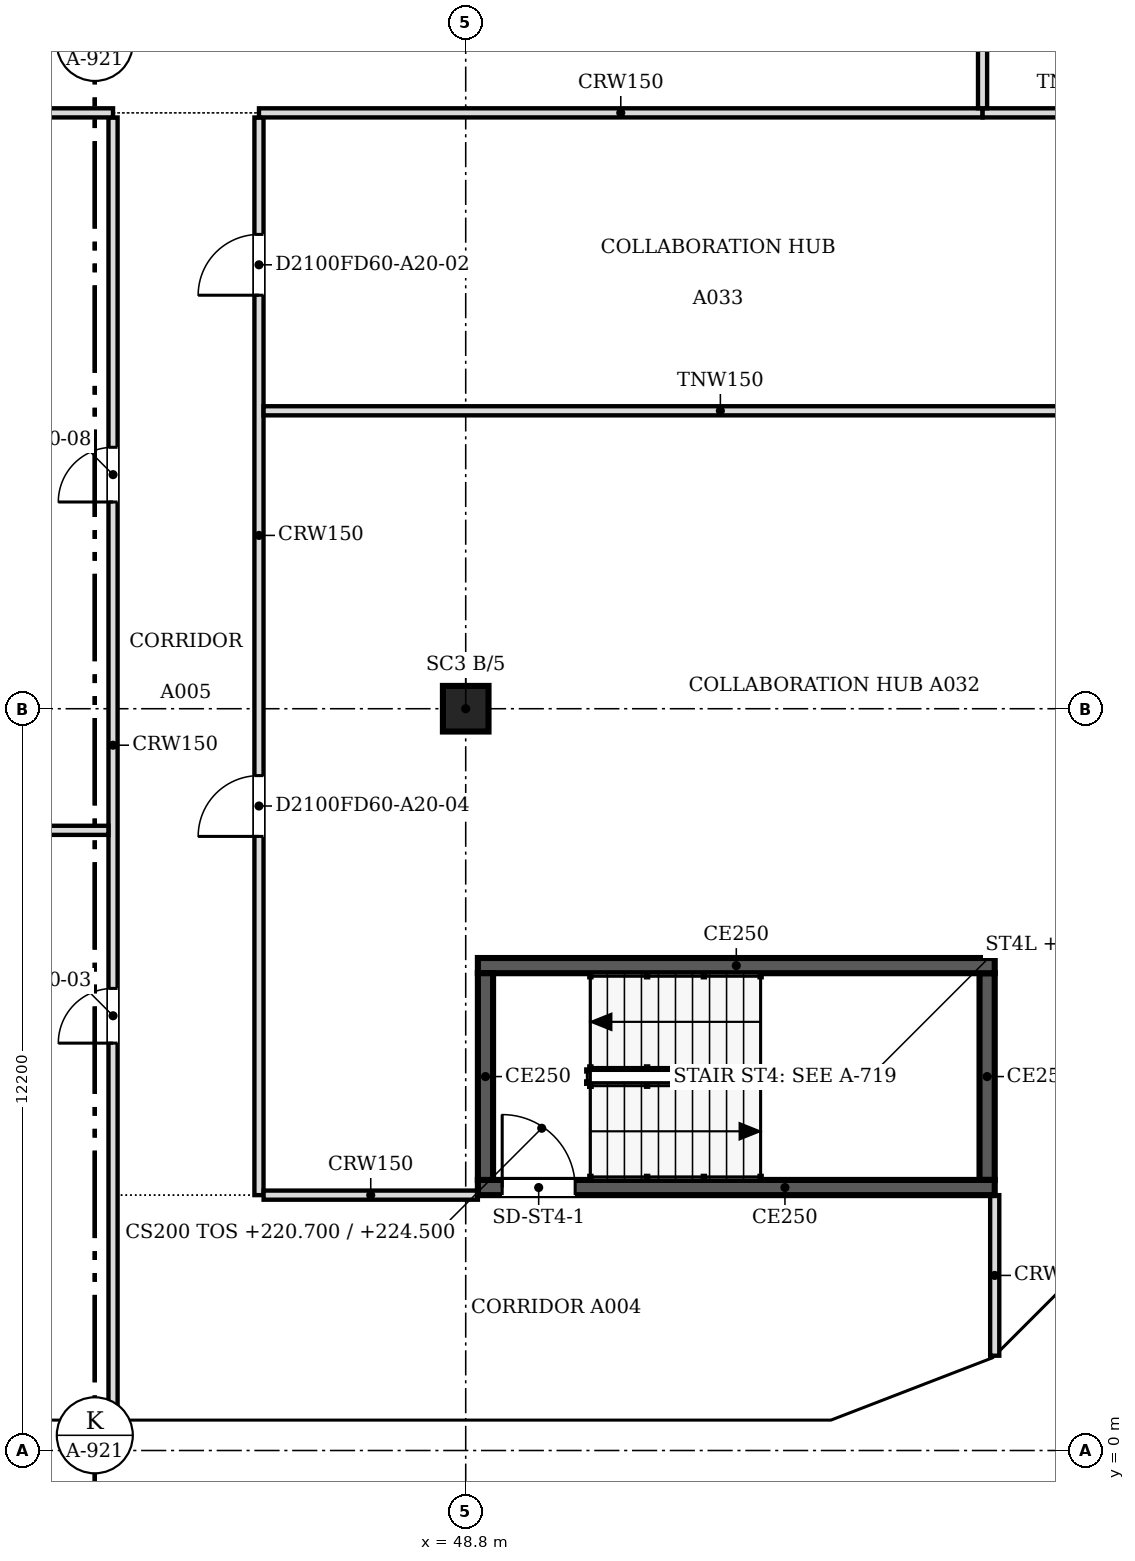
"""IFC4 building model, lengths in metres.
Left out: names, types, materials, properties, quantities, classifications, styles, units other than length and angle.
Written with IfcOpenShell. Run it as: python <this file> out.ifc"""

import sys

from ifc_helpers import new_model, si_unit, direction, frame, frame_2d, origin, origin_2d, place, context, subcontext, project, spatial, polyline, rectangle, outline, extrude, faceted_brep, source, transform, mapped, element, fill, save


model = new_model("IFC4")
c1 = context("Model", 3, precision=1e-05, world=origin(), true_north=direction((0.0, 1.0)))
c2 = subcontext(c1, "Body", "Model", "MODEL_VIEW")
j1 = project(units=[si_unit("LENGTHUNIT", "METRE"), si_unit("PLANEANGLEUNIT", "RADIAN")], contexts=[c1])
p1 = place(None, origin())
s1 = spatial("IfcSite", under=j1, at=p1, CompositionType="ELEMENT")
p2 = place(p1, origin())
s2 = spatial("IfcBuilding", under=s1, at=p2, CompositionType="ELEMENT")
p3 = place(p2, frame((0.0, 0.0, 220.7)))
s3 = spatial("IfcBuildingStorey", under=s2, at=p3, CompositionType="ELEMENT", Elevation=220.7)
p4 = place(p3, frame((48.8, 12.2, 0.0), z_axis=(0.0, 0.0, 1.0), x_axis=(1.0, 0.0, 0.0)))
e1 = element("IfcColumn", 1, at=p4, inside=s3, PredefinedType="COLUMN", context=c2, shape_type="SweptSolid", body=[
    extrude(rectangle(XDim=0.75, YDim=0.75, at=origin_2d()), origin(), (0.0, 0.0, 1.0), 3.6),
])
m1 = source(origin(), c2, "Body", "SweptSolid", [
    extrude(outline(polyline([(3.05, 0.0), (6.1, 3.8), (3.05, 7.6), (0.0, 3.8), (3.05, 0.0)])), frame((0.0, 0.25, 0.0), z_axis=(0.0, -1.0, 0.0), x_axis=(1.0, 0.0, 0.0)), (0.0, 0.0, 1.0), 0.5),
])
p5 = place(p3, frame((39.65, 0.25, -3.8), z_axis=(0.0, 0.0, 1.0), x_axis=(1.0, 0.0, 0.0)))
e2 = element("IfcWall", 2, at=p5, inside=s3, PredefinedType="SOLIDWALL", context=c2, shape_type="MappedRepresentation", body=[
    mapped(m1, transform((0.0, 0.0, 0.0), scale=1.0)),
])
m2 = source(origin(), c2, "Body", "SweptSolid", [
    extrude(outline(polyline([(3.05, 0.399), (5.78, 3.8), (3.05, 7.201), (0.321, 3.8), (3.05, 0.399)])), frame((0.0, 0.26, 0.0), z_axis=(0.0, -1.0, 0.0), x_axis=(1.0, 0.0, 0.0)), (0.0, 0.0, 1.0), 0.52),
])
p6 = place(p5, origin())
e3 = element("IfcOpeningElement", 3, at=p6, cuts=e2, PredefinedType="OPENING", context=c2, shape_type="MappedRepresentation", body=[
    mapped(m2, transform((0.0, 0.0, 0.0), scale=1.0)),
])
p7 = place(p3, frame((45.75, 0.25, -3.8), z_axis=(0.0, 0.0, 1.0), x_axis=(1.0, 0.0, 0.0)))
e4 = element("IfcWall", 4, at=p7, inside=s3, PredefinedType="SOLIDWALL", context=c2, shape_type="MappedRepresentation", body=[
    mapped(m1, transform((0.0, 0.0, 0.0), scale=1.0)),
])
p8 = place(p7, origin())
e5 = element("IfcOpeningElement", 5, at=p8, cuts=e4, PredefinedType="OPENING", context=c2, shape_type="MappedRepresentation", body=[
    mapped(m2, transform((0.0, 0.0, 0.0), scale=1.0)),
])
m3 = source(origin(), c2, "Body", "Brep", [
    faceted_brep([(3.003, -0.25, 0.0), (3.05, -0.25, 0.06), (3.05, -0.25, 7.54), (3.003, -0.25, 7.6), (0.0, -0.25, 3.8), (0.0, 0.25, 3.8), (2.957, 0.25, 7.541), (2.957, 0.25, 0.059), (3.003, 0.0, 0.0), (3.003, 0.0, 7.6)], [[[0, 1, 2, 3, 4]], [[5, 6, 7]], [[1, 0, 8]], [[9, 3, 2]], [[6, 5, 4, 3, 9]], [[5, 7, 8, 0, 4]], [[1, 8, 7, 6, 9, 2]]]),
])
p9 = place(p3, frame((51.85, 0.25, -3.8), z_axis=(0.0, 0.0, 1.0), x_axis=(1.0, 0.0, 0.0)))
e6 = element("IfcWall", 6, at=p9, inside=s3, PredefinedType="SOLIDWALL", context=c2, shape_type="MappedRepresentation", body=[
    mapped(m3, transform((0.0, 0.0, 0.0), scale=1.0)),
])
m4 = source(origin(), c2, "Body", "SweptSolid", [
    extrude(outline(polyline([(2.803, 6.944), (0.319, 3.8), (2.803, 0.656), (2.803, 6.944)])), frame((0.0, 0.26, 0.0), z_axis=(0.0, -1.0, 0.0), x_axis=(1.0, 0.0, 0.0)), (0.0, 0.0, 1.0), 0.52),
])
p10 = place(p9, origin())
e7 = element("IfcOpeningElement", 7, at=p10, cuts=e6, PredefinedType="OPENING", context=c2, shape_type="MappedRepresentation", body=[
    mapped(m4, transform((0.0, 0.0, 0.0), scale=1.0)),
])
m5 = source(origin(), c2, "Body", "Brep", [
    faceted_brep([(0.047, -0.25, 0.0), (2.997, -0.25, 3.8), (0.047, -0.25, 7.6), (0.0, -0.25, 7.541), (0.0, -0.25, 0.059), (0.093, 0.25, 7.54), (2.944, 0.25, 3.868), (2.944, 0.25, 3.732), (0.093, 0.25, 0.06), (2.997, 0.0, 3.8), (0.047, 0.0, 0.0), (0.047, 0.0, 7.6)], [[[0, 1, 2, 3, 4]], [[5, 6, 7, 8]], [[8, 7, 9, 1, 0, 10]], [[6, 5, 11, 2, 1, 9]], [[3, 2, 11]], [[10, 0, 4]], [[8, 10, 4, 3, 11, 5]], [[9, 7, 6]]]),
])
p11 = place(p3, frame((54.81, 0.233, -3.8), z_axis=(0.0, 0.0, 1.0), x_axis=(0.932990326376, 0.359901446078, 0.0)))
e8 = element("IfcWall", 8, at=p11, inside=s3, PredefinedType="SOLIDWALL", context=c2, shape_type="MappedRepresentation", body=[
    mapped(m5, transform((0.0, 0.0, 0.0), scale=1.0)),
])
m6 = source(origin(), c2, "Body", "SweptSolid", [
    extrude(outline(polyline([(0.247, 0.665), (2.681, 3.8), (0.247, 6.935), (0.247, 0.665)])), frame((0.0, 0.26, 0.0), z_axis=(0.0, -1.0, 0.0), x_axis=(1.0, 0.0, 0.0)), (0.0, 0.0, 1.0), 0.52),
])
p12 = place(p11, origin())
e9 = element("IfcOpeningElement", 9, at=p12, cuts=e8, PredefinedType="OPENING", context=c2, shape_type="MappedRepresentation", body=[
    mapped(m6, transform((0.0, 0.0, 0.0), scale=1.0)),
])
m7 = source(origin(), c2, "Body", "Brep", [
    faceted_brep([(2.944, -0.25, 0.0), (2.997, -0.25, 0.068), (2.997, -0.25, 7.532), (2.944, -0.25, 7.6), (0.0, -0.25, 3.8), (0.053, 0.25, 3.868), (2.891, 0.25, 7.532), (2.891, 0.25, 0.068), (0.053, 0.25, 3.732), (2.944, 0.0, 0.0), (2.944, 0.0, 7.6), (0.0, 0.0, 3.8)], [[[0, 1, 2, 3, 4]], [[5, 6, 7, 8]], [[1, 0, 9]], [[10, 3, 2]], [[6, 5, 11, 4, 3, 10]], [[8, 7, 9, 0, 4, 11]], [[8, 11, 5]], [[1, 9, 7, 6, 10, 2]]]),
])
p13 = place(p3, frame((57.606, 1.312, -3.8), z_axis=(0.0, 0.0, 1.0), x_axis=(0.707147509625, 0.707066050402, 0.0)))
e10 = element("IfcWall", 10, at=p13, inside=s3, PredefinedType="SOLIDWALL", context=c2, shape_type="MappedRepresentation", body=[
    mapped(m7, transform((0.0, 0.0, 0.0), scale=1.0)),
])
m8 = source(origin(), c2, "Body", "SweptSolid", [
    extrude(outline(polyline([(2.744, 6.934), (0.316, 3.8), (2.744, 0.667), (2.744, 6.934)])), frame((0.0, 0.26, 0.0), z_axis=(0.0, -1.0, 0.0), x_axis=(1.0, 0.0, 0.0)), (0.0, 0.0, 1.0), 0.52),
])
p14 = place(p13, origin())
e11 = element("IfcOpeningElement", 11, at=p14, cuts=e10, PredefinedType="OPENING", context=c2, shape_type="MappedRepresentation", body=[
    mapped(m8, transform((0.0, 0.0, 0.0), scale=1.0)),
])
p15 = place(p2, frame((0.0, 0.0, 224.5)))
s4 = spatial("IfcBuildingStorey", under=s2, at=p15, CompositionType="ELEMENT", Elevation=224.5)
m9 = source(origin(), c2, "Body", "Brep", [
    faceted_brep([(3.05, -0.25, 0.0), (6.1, -0.25, 3.8), (6.1, -0.25, 3.8), (3.05, -0.25, 7.6), (0.0, -0.25, 3.8), (0.0, 0.25, 3.8), (3.05, 0.25, 7.6), (6.1, 0.25, 3.8), (6.1, 0.25, 3.8), (3.05, 0.25, 0.0)], [[[0, 1, 2, 3, 4]], [[5, 6, 7, 8, 9]], [[9, 8, 1, 0]], [[7, 6, 3, 2]], [[6, 5, 4, 3]], [[5, 9, 0, 4]], [[1, 8, 7, 2]]]),
])
p16 = place(p15, frame((36.6, 0.25, -3.8), z_axis=(0.0, 0.0, 1.0), x_axis=(1.0, 0.0, 0.0)))
e12 = element("IfcWall", 12, at=p16, inside=s4, PredefinedType="SOLIDWALL", context=c2, shape_type="MappedRepresentation", body=[
    mapped(m9, transform((0.0, 0.0, 0.0), scale=1.0)),
])
p17 = place(p16, origin())
e13 = element("IfcOpeningElement", 13, at=p17, cuts=e12, PredefinedType="OPENING", context=c2, shape_type="MappedRepresentation", body=[
    mapped(m2, transform((0.0, 0.0, 0.0), scale=1.0)),
])
p18 = place(p15, frame((42.7, 0.25, -3.8), z_axis=(0.0, 0.0, 1.0), x_axis=(1.0, 0.0, 0.0)))
e14 = element("IfcWall", 14, at=p18, inside=s4, PredefinedType="SOLIDWALL", context=c2, shape_type="MappedRepresentation", body=[
    mapped(m1, transform((0.0, 0.0, 0.0), scale=1.0)),
])
p19 = place(p18, origin())
e15 = element("IfcOpeningElement", 15, at=p19, cuts=e14, PredefinedType="OPENING", context=c2, shape_type="MappedRepresentation", body=[
    mapped(m2, transform((0.0, 0.0, 0.0), scale=1.0)),
])
m10 = source(origin(), c2, "Body", "Brep", [
    faceted_brep([(3.05, -0.25, 0.0), (6.053, -0.25, 3.8), (3.05, -0.25, 7.6), (0.0, -0.25, 3.8), (0.0, 0.25, 3.8), (3.05, 0.25, 7.6), (6.007, 0.25, 3.859), (6.007, 0.25, 3.741), (3.05, 0.25, 0.0), (6.053, 0.0, 3.8)], [[[0, 1, 2, 3]], [[4, 5, 6, 7, 8]], [[8, 7, 9, 1, 0]], [[6, 5, 2, 1, 9]], [[5, 4, 3, 2]], [[4, 8, 0, 3]], [[9, 7, 6]]]),
])
p20 = place(p15, frame((48.8, 0.25, -3.8), z_axis=(0.0, 0.0, 1.0), x_axis=(1.0, 0.0, 0.0)))
e16 = element("IfcWall", 16, at=p20, inside=s4, PredefinedType="SOLIDWALL", context=c2, shape_type="MappedRepresentation", body=[
    mapped(m10, transform((0.0, 0.0, 0.0), scale=1.0)),
])
m11 = source(origin(), c2, "Body", "SweptSolid", [
    extrude(outline(polyline([(3.049, 0.401), (5.735, 3.8), (3.049, 7.199), (0.321, 3.8), (3.049, 0.401)])), frame((0.0, 0.26, 0.0), z_axis=(0.0, -1.0, 0.0), x_axis=(1.0, 0.0, 0.0)), (0.0, 0.0, 1.0), 0.52),
])
p21 = place(p20, origin())
e17 = element("IfcOpeningElement", 17, at=p21, cuts=e16, PredefinedType="OPENING", context=c2, shape_type="MappedRepresentation", body=[
    mapped(m11, transform((0.0, 0.0, 0.0), scale=1.0)),
])
m12 = source(origin(), c2, "Body", "Brep", [
    faceted_brep([(2.95, -0.25, 0.0), (3.003, -0.25, 0.068), (3.003, -0.25, 7.532), (2.95, -0.25, 7.6), (0.0, -0.25, 3.8), (0.047, 0.25, 3.86), (2.898, 0.25, 7.532), (2.898, 0.25, 0.068), (0.047, 0.25, 3.74), (2.95, 0.0, 0.0), (2.95, 0.0, 7.6), (0.0, 0.0, 3.8)], [[[0, 1, 2, 3, 4]], [[5, 6, 7, 8]], [[1, 0, 9]], [[10, 3, 2]], [[6, 5, 11, 4, 3, 10]], [[8, 7, 9, 0, 4, 11]], [[8, 11, 5]], [[1, 9, 7, 6, 10, 2]]]),
])
p22 = place(p15, frame((54.854, 0.25, -3.8), z_axis=(0.0, 0.0, 1.0), x_axis=(0.932970071518, 0.359953949349, 0.0)))
e18 = element("IfcWall", 18, at=p22, inside=s4, PredefinedType="SOLIDWALL", context=c2, shape_type="MappedRepresentation", body=[
    mapped(m12, transform((0.0, 0.0, 0.0), scale=1.0)),
])
m13 = source(origin(), c2, "Body", "SweptSolid", [
    extrude(outline(polyline([(2.75, 6.935), (0.316, 3.8), (2.75, 0.665), (2.75, 6.935)])), frame((0.0, 0.26, 0.0), z_axis=(0.0, -1.0, 0.0), x_axis=(1.0, 0.0, 0.0)), (0.0, 0.0, 1.0), 0.52),
])
p23 = place(p22, origin())
e19 = element("IfcOpeningElement", 19, at=p23, cuts=e18, PredefinedType="OPENING", context=c2, shape_type="MappedRepresentation", body=[
    mapped(m13, transform((0.0, 0.0, 0.0), scale=1.0)),
])
m14 = source(origin(), c2, "Body", "Brep", [
    faceted_brep([(0.053, -0.25, 0.0), (2.997, -0.25, 3.8), (0.053, -0.25, 7.6), (0.0, -0.25, 7.532), (0.0, -0.25, 0.068), (0.106, 0.25, 7.532), (2.944, 0.25, 3.868), (2.944, 0.25, 3.732), (0.106, 0.25, 0.068), (2.997, 0.0, 3.8), (0.053, 0.0, 0.0), (0.053, 0.0, 7.6)], [[[0, 1, 2, 3, 4]], [[5, 6, 7, 8]], [[8, 7, 9, 1, 0, 10]], [[6, 5, 11, 2, 1, 9]], [[3, 2, 11]], [[10, 0, 4]], [[8, 10, 4, 3, 11, 5]], [[9, 7, 6]]]),
])
p24 = place(p15, frame((57.569, 1.274, -3.8), z_axis=(0.0, 0.0, 1.0), x_axis=(0.707066050402, 0.707147509625, 0.0)))
e20 = element("IfcWall", 20, at=p24, inside=s4, PredefinedType="SOLIDWALL", context=c2, shape_type="MappedRepresentation", body=[
    mapped(m14, transform((0.0, 0.0, 0.0), scale=1.0)),
])
m15 = source(origin(), c2, "Body", "SweptSolid", [
    extrude(outline(polyline([(0.253, 0.666), (2.681, 3.8), (0.253, 6.934), (0.253, 0.666)])), frame((0.0, 0.26, 0.0), z_axis=(0.0, -1.0, 0.0), x_axis=(1.0, 0.0, 0.0)), (0.0, 0.0, 1.0), 0.52),
])
p25 = place(p24, origin())
e21 = element("IfcOpeningElement", 21, at=p25, cuts=e20, PredefinedType="OPENING", context=c2, shape_type="MappedRepresentation", body=[
    mapped(m15, transform((0.0, 0.0, 0.0), scale=1.0)),
])
p26 = place(p3, frame((57.5, 4.325, 0.0), z_axis=(0.0, 0.0, 1.0), x_axis=(-1.0, 0.0, 0.0)))
e22 = element("IfcWall", 22, at=p26, inside=s3, PredefinedType="SOLIDWALL", context=c2, shape_type="SweptSolid", body=[
    extrude(rectangle(XDim=8.5, YDim=0.25, at=frame_2d((4.25, 0.0))), origin(), (0.0, 0.0, 1.0), 3.8),
])
m16 = source(origin(), c2, "Body", "SweptSolid", [
    extrude(rectangle(XDim=1.2, YDim=2.1, at=frame_2d((0.6, 1.05))), frame((0.0, 0.135, 0.0), z_axis=(0.0, -1.0, 0.0), x_axis=(1.0, 0.0, 0.0)), (0.0, 0.0, 1.0), 0.27),
])
p27 = place(p26, frame((6.9, 0.0, 0.0)))
e23 = element("IfcOpeningElement", 23, at=p27, cuts=e22, PredefinedType="OPENING", context=c2, shape_type="MappedRepresentation", body=[
    mapped(m16, transform((0.0, 0.0, 0.0), scale=1.0)),
])
p28 = place(p3, frame((49.125, 4.45, 0.0), z_axis=(0.0, 0.0, 1.0), x_axis=(0.0, 1.0, 0.0)))
e24 = element("IfcWall", 24, at=p28, inside=s3, PredefinedType="SOLIDWALL", context=c2, shape_type="SweptSolid", body=[
    extrude(rectangle(XDim=3.4, YDim=0.25, at=frame_2d((1.7, 0.0))), origin(), (0.0, 0.0, 1.0), 3.8),
])
p29 = place(p3, frame((49.0, 7.975, 0.0), z_axis=(0.0, 0.0, 1.0), x_axis=(1.0, 0.0, 0.0)))
e25 = element("IfcWall", 25, at=p29, inside=s3, PredefinedType="SOLIDWALL", context=c2, shape_type="SweptSolid", body=[
    extrude(rectangle(XDim=8.5, YDim=0.25, at=frame_2d((4.25, 0.0))), origin(), (0.0, 0.0, 1.0), 3.8),
])
p30 = place(p3, frame((57.375, 7.85, 0.0), z_axis=(0.0, 0.0, 1.0), x_axis=(0.0, -1.0, 0.0)))
e26 = element("IfcWall", 26, at=p30, inside=s3, PredefinedType="SOLIDWALL", context=c2, shape_type="SweptSolid", body=[
    extrude(rectangle(XDim=3.4, YDim=0.25, at=frame_2d((1.7, 0.0))), origin(), (0.0, 0.0, 1.0), 3.8),
])
p31 = place(p3, frame((43.0, 0.5, 0.0), z_axis=(0.0, 0.0, 1.0), x_axis=(0.0, 1.0, 0.0)))
e27 = element("IfcWall", 27, at=p31, inside=s3, PredefinedType="PARTITIONING", context=c2, shape_type="SweptSolid", body=[
    extrude(rectangle(XDim=21.424, YDim=0.15, at=frame_2d((10.712, 0.0))), origin(), (0.0, 0.0, 1.0), 3.067),
])
m17 = source(origin(), c2, "Body", "SweptSolid", [
    extrude(rectangle(XDim=0.9, YDim=2.1, at=frame_2d((0.45, 1.05))), frame((0.0, 0.085, 0.0), z_axis=(0.0, -1.0, 0.0), x_axis=(1.0, 0.0, 0.0)), (0.0, 0.0, 1.0), 0.17),
])
p32 = place(p31, frame((6.2, 0.0, 0.0)))
e28 = element("IfcOpeningElement", 28, at=p32, cuts=e27, PredefinedType="OPENING", context=c2, shape_type="MappedRepresentation", body=[
    mapped(m17, transform((0.0, 0.0, 0.0), scale=1.0)),
])
p33 = place(p31, frame((15.1, 0.0, 0.0)))
e29 = element("IfcOpeningElement", 29, at=p33, cuts=e27, PredefinedType="OPENING", context=c2, shape_type="MappedRepresentation", body=[
    mapped(m17, transform((0.0, 0.0, 0.0), scale=1.0)),
])
p34 = place(p3, frame((57.5, 1.559, 0.0), z_axis=(0.0, 0.0, 1.0), x_axis=(0.0, 1.0, 0.0)))
e30 = element("IfcWall", 30, at=p34, inside=s3, PredefinedType="PARTITIONING", context=c2, shape_type="SweptSolid", body=[
    extrude(rectangle(XDim=2.641, YDim=0.15, at=frame_2d((1.32, 0.0))), origin(), (0.0, 0.0, 1.0), 3.067),
])
p35 = place(p3, frame((45.4, 21.924, 0.0), z_axis=(0.0, 0.0, 1.0), x_axis=(0.0, -1.0, 0.0)))
e31 = element("IfcWall", 31, at=p35, inside=s3, PredefinedType="PARTITIONING", context=c2, shape_type="SweptSolid", body=[
    extrude(rectangle(XDim=17.724, YDim=0.15, at=frame_2d((8.862, 0.0))), origin(), (0.0, 0.0, 1.0), 3.067),
])
m18 = source(origin(), c2, "Body", "SweptSolid", [
    extrude(rectangle(XDim=1.0, YDim=2.1, at=frame_2d((0.5, 1.05))), frame((0.0, 0.085, 0.0), z_axis=(0.0, -1.0, 0.0), x_axis=(1.0, 0.0, 0.0)), (0.0, 0.0, 1.0), 0.17),
])
p36 = place(p35, frame((1.923, 0.0, 0.0)))
e32 = element("IfcOpeningElement", 32, at=p36, cuts=e31, PredefinedType="OPENING", context=c2, shape_type="MappedRepresentation", body=[
    mapped(m18, transform((0.0, 0.0, 0.0), scale=1.0)),
])
p37 = place(p35, frame((10.824, 0.0, 0.0)))
e33 = element("IfcOpeningElement", 33, at=p37, cuts=e31, PredefinedType="OPENING", context=c2, shape_type="MappedRepresentation", body=[
    mapped(m18, transform((0.0, 0.0, 0.0), scale=1.0)),
])
p38 = place(p3, frame((45.476, 4.2, 0.0), z_axis=(0.0, 0.0, 1.0), x_axis=(1.0, 0.0, 0.0)))
e34 = element("IfcWall", 34, at=p38, inside=s3, PredefinedType="PARTITIONING", context=c2, shape_type="SweptSolid", body=[
    extrude(rectangle(XDim=3.524, YDim=0.15, at=frame_2d((1.762, 0.0))), origin(), (0.0, 0.0, 1.0), 3.067),
])
p39 = place(p3, frame((27.575, 10.2, 0.0), z_axis=(0.0, 0.0, 1.0), x_axis=(1.0, 0.0, 0.0)))
e35 = element("IfcWall", 35, at=p39, inside=s3, PredefinedType="PARTITIONING", context=c2, shape_type="SweptSolid", body=[
    extrude(rectangle(XDim=15.349, YDim=0.15, at=frame_2d((7.675, 0.0))), origin(), (0.0, 0.0, 1.0), 3.067),
])
p40 = place(p3, frame((45.476, 17.1, 0.0), z_axis=(0.0, 0.0, 1.0), x_axis=(1.0, 0.0, 0.0)))
e36 = element("IfcWall", 36, at=p40, inside=s3, PredefinedType="PARTITIONING", context=c2, shape_type="SweptSolid", body=[
    extrude(rectangle(XDim=15.024, YDim=0.15, at=frame_2d((7.512, 0.0))), origin(), (0.0, 0.0, 1.0), 3.067),
])
p41 = place(p3, frame((30.5, 22.0, 0.0), z_axis=(0.0, 0.0, 1.0), x_axis=(1.0, 0.0, 0.0)))
e37 = element("IfcWall", 37, at=p41, inside=s3, PredefinedType="PARTITIONING", context=c2, shape_type="SweptSolid", body=[
    extrude(rectangle(XDim=12.5, YDim=0.15, at=frame_2d((6.25, 0.0))), origin(), (0.0, 0.0, 1.0), 3.067),
])
p42 = place(p3, frame((45.4, 22.0, 0.0), z_axis=(0.0, 0.0, 1.0), x_axis=(1.0, 0.0, 0.0)))
e38 = element("IfcWall", 38, at=p42, inside=s3, PredefinedType="PARTITIONING", context=c2, shape_type="SweptSolid", body=[
    extrude(rectangle(XDim=11.9, YDim=0.15, at=frame_2d((5.95, 0.0))), origin(), (0.0, 0.0, 1.0), 3.067),
])
p43 = place(p3, frame((57.301, 22.0, 0.0), z_axis=(0.0, 0.0, 1.0), x_axis=(1.0, 0.0, 0.0)))
e39 = element("IfcWall", 39, at=p43, inside=s3, PredefinedType="PARTITIONING", context=c2, shape_type="SweptSolid", body=[
    extrude(rectangle(XDim=3.199, YDim=0.15, at=frame_2d((1.6, 0.0))), origin(), (0.0, 0.0, 1.0), 3.067),
])
p44 = place(p3, frame((57.3, 30.6, 0.0), z_axis=(0.0, 0.0, 1.0), x_axis=(0.0, -1.0, 0.0)))
e40 = element("IfcWall", 40, at=p44, inside=s3, PredefinedType="PARTITIONING", context=c2, shape_type="SweptSolid", body=[
    extrude(rectangle(XDim=8.524, YDim=0.15, at=frame_2d((4.262, 0.0))), origin(), (0.0, 0.0, 1.0), 3.067),
])
p45 = place(p44, frame((3.824, 0.0, 0.0)))
e41 = element("IfcOpeningElement", 41, at=p45, cuts=e40, PredefinedType="OPENING", context=c2, shape_type="MappedRepresentation", body=[
    mapped(m17, transform((0.0, 0.0, 0.0), scale=1.0)),
])
m19 = source(origin(), c2, "Body", "SweptSolid", [
    extrude(rectangle(XDim=1.2, YDim=2.1, at=frame_2d((0.6, 1.05))), frame((0.0, 0.025, 0.0), z_axis=(0.0, -1.0, 0.0), x_axis=(1.0, 0.0, 0.0)), (0.0, 0.0, 1.0), 0.05),
])
p46 = place(p27, origin())
e42 = element("IfcDoor", 42, at=p46, inside=s3, OperationType="SINGLE_SWING_RIGHT", PredefinedType="DOOR", context=c2, shape_type="MappedRepresentation", body=[
    mapped(m19, transform((0.0, 0.0, 0.0), scale=1.0)),
])
fill(e23, e42)
m20 = source(origin(), c2, "Body", "SweptSolid", [
    extrude(rectangle(XDim=1.0, YDim=2.1, at=frame_2d((0.5, 1.05))), frame((0.0, 0.025, 0.0), z_axis=(0.0, -1.0, 0.0), x_axis=(1.0, 0.0, 0.0)), (0.0, 0.0, 1.0), 0.05),
])
p47 = place(p36, origin())
e43 = element("IfcDoor", 43, at=p47, inside=s3, OperationType="SINGLE_SWING_RIGHT", PredefinedType="DOOR", context=c2, shape_type="MappedRepresentation", body=[
    mapped(m20, transform((0.0, 0.0, 0.0), scale=1.0)),
])
fill(e32, e43)
m21 = source(origin(), c2, "Body", "SweptSolid", [
    extrude(rectangle(XDim=0.9, YDim=2.1, at=frame_2d((0.45, 1.05))), frame((0.0, 0.025, 0.0), z_axis=(0.0, -1.0, 0.0), x_axis=(1.0, 0.0, 0.0)), (0.0, 0.0, 1.0), 0.05),
])
p48 = place(p32, origin())
e44 = element("IfcDoor", 44, at=p48, inside=s3, OperationType="SINGLE_SWING_LEFT", PredefinedType="DOOR", context=c2, shape_type="MappedRepresentation", body=[
    mapped(m21, transform((0.0, 0.0, 0.0), scale=1.0)),
])
fill(e28, e44)
p49 = place(p33, origin())
e45 = element("IfcDoor", 45, at=p49, inside=s3, OperationType="SINGLE_SWING_LEFT", PredefinedType="DOOR", context=c2, shape_type="MappedRepresentation", body=[
    mapped(m21, transform((0.0, 0.0, 0.0), scale=1.0)),
])
fill(e29, e45)
p50 = place(p37, origin())
e46 = element("IfcDoor", 46, at=p50, inside=s3, OperationType="SINGLE_SWING_RIGHT", PredefinedType="DOOR", context=c2, shape_type="MappedRepresentation", body=[
    mapped(m20, transform((0.0, 0.0, 0.0), scale=1.0)),
])
fill(e33, e46)
save(model, sys.argv[1])
